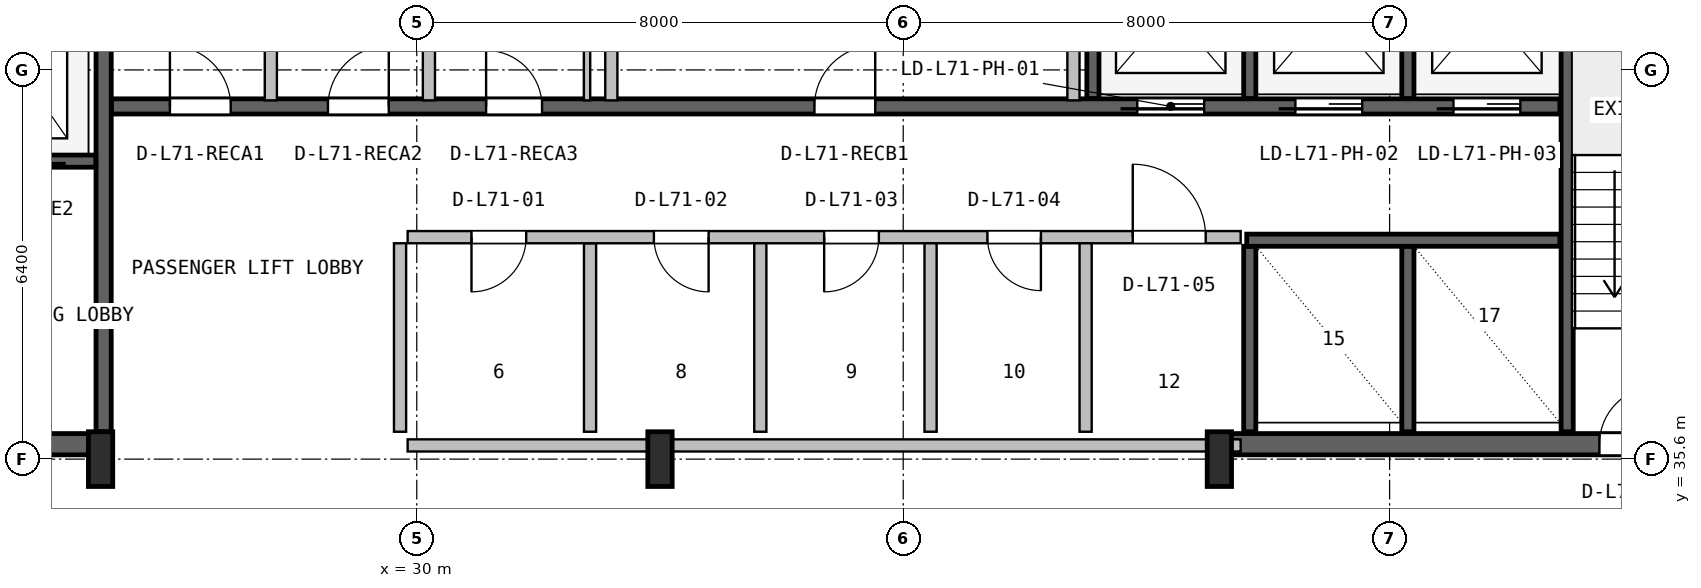
"""IFC4 building model, lengths in metres.
Left out: names, types, materials, properties, quantities, classifications, styles, units other than length and angle.
Written with IfcOpenShell. Run it as: python <this file> out.ifc"""

import sys

from ifc_helpers import new_model, si_unit, direction, frame, frame_2d, origin, origin_2d, place, context, subcontext, project, spatial, rectangle, i_section, extrude, source, transform, mapped, element, fill, save


model = new_model("IFC4")
c1 = context("Model", 3, precision=1e-05, world=origin(), true_north=direction((0.0, 1.0)))
c2 = subcontext(c1, "Body", "Model", "MODEL_VIEW")
j1 = project(units=[si_unit("LENGTHUNIT", "METRE"), si_unit("PLANEANGLEUNIT", "RADIAN")], contexts=[c1])
p1 = place(None, origin())
s1 = spatial("IfcSite", under=j1, at=p1, CompositionType="ELEMENT")
p2 = place(p1, origin())
s2 = spatial("IfcBuilding", under=s1, at=p2, CompositionType="ELEMENT")
p3 = place(p2, frame((0.0, 0.0, 285.0)))
s3 = spatial("IfcBuildingStorey", under=s2, at=p3, CompositionType="ELEMENT", Elevation=285.0)
p4 = place(p3, frame((15.67, 35.845, 0.0), z_axis=(0.0, 0.0, 1.0), x_axis=(1.0, 0.0, 0.0)))
e1 = element("IfcWall", 1, at=p4, inside=s3, PredefinedType="SHEAR", context=c2, shape_type="SweptSolid", body=[
    extrude(rectangle(XDim=9.13, YDim=0.35, at=frame_2d((4.565, 0.0))), origin(), (0.0, 0.0, 1.0), 3.55),
])
p5 = place(p4, frame((5.4, 0.0, 0.0)))
e2 = element("IfcOpeningElement", 2, at=p5, cuts=e1, PredefinedType="OPENING", context=c2, shape_type="SweptSolid", body=[
    extrude(rectangle(XDim=1.0, YDim=2.1, at=frame_2d((0.5, 1.05))), frame((0.0, 0.185, 0.0), z_axis=(0.0, -1.0, 0.0), x_axis=(1.0, 0.0, 0.0)), (0.0, 0.0, 1.0), 0.37),
])
p6 = place(p3, frame((43.2, 35.845, 0.0), z_axis=(0.0, 0.0, 1.0), x_axis=(1.0, 0.0, 0.0)))
e3 = element("IfcWall", 3, at=p6, inside=s3, PredefinedType="SHEAR", context=c2, shape_type="SweptSolid", body=[
    extrude(rectangle(XDim=9.13, YDim=0.35, at=frame_2d((4.565, 0.0))), origin(), (0.0, 0.0, 1.0), 3.55),
])
p7 = place(p6, frame((6.25, 0.0, 0.0)))
e4 = element("IfcOpeningElement", 4, at=p7, cuts=e3, PredefinedType="OPENING", context=c2, shape_type="SweptSolid", body=[
    extrude(rectangle(XDim=0.95, YDim=2.1, at=frame_2d((0.475, 1.05))), frame((0.0, 0.185, 0.0), z_axis=(0.0, -1.0, 0.0), x_axis=(1.0, 0.0, 0.0)), (0.0, 0.0, 1.0), 0.37),
])
m1 = source(origin(), c2, "Body", "SweptSolid", [
    extrude(i_section(OverallWidth=0.4, OverallDepth=0.9, WebThickness=0.016, FlangeThickness=0.028, FilletRadius=0.016, at=origin_2d()), origin(), (0.0, 0.0, 1.0), 3.8),
])
for number, where, z_axis, x_axis in (
    (5, (24.8, 35.6, 0.0), (0.0, 0.0, 1.0), (1.0, 0.0, 0.0)),
    (6, (34.0, 35.6, 0.0), (0.0, 0.0, 1.0), (1.0, 0.0, 0.0)),
    (7, (43.2, 35.6, 0.0), (0.0, 0.0, 1.0), (1.0, 0.0, 0.0)),
):
    element("IfcColumn", number, at=place(p3, frame(where, z_axis=z_axis, x_axis=x_axis)), inside=s3, PredefinedType="COLUMN", context=c2, shape_type="MappedRepresentation", body=[
        mapped(m1, transform((0.0, 0.0, 0.0), x_axis=(1.0, 0.0, 0.0), y_axis=(0.0, 1.0, 0.0), z_axis=(0.0, 0.0, 1.0), scale=1.0)),
    ])
p8 = place(p3, frame((24.85, 36.05, 0.0), z_axis=(0.0, 0.0, 1.0), x_axis=(0.0, 1.0, 0.0)))
e8 = element("IfcWall", 8, at=p8, inside=s3, PredefinedType="SHEAR", context=c2, shape_type="SweptSolid", body=[
    extrude(rectangle(XDim=10.45, YDim=0.25, at=frame_2d((5.225, 0.0))), origin(), (0.0, 0.0, 1.0), 3.55),
])
p9 = place(p3, frame((19.2, 40.5, 0.0), z_axis=(0.0, 0.0, 1.0), x_axis=(1.0, 0.0, 0.0)))
e9 = element("IfcWall", 9, at=p9, inside=s3, PredefinedType="SHEAR", context=c2, shape_type="SweptSolid", body=[
    extrude(rectangle(XDim=5.52, YDim=0.2, at=frame_2d((2.76, 0.0))), origin(), (0.0, 0.0, 1.0), 3.55),
])
p10 = place(p9, frame((1.05, 0.0, 0.0)))
e10 = element("IfcOpeningElement", 10, at=p10, cuts=e9, PredefinedType="OPENING", context=c2, shape_type="SweptSolid", body=[
    extrude(rectangle(XDim=1.1, YDim=2.18, at=frame_2d((0.55, 1.09))), frame((0.0, 0.11, 0.0), z_axis=(0.0, -1.0, 0.0), x_axis=(1.0, 0.0, 0.0)), (0.0, 0.0, 1.0), 0.22),
])
p11 = place(p9, frame((3.65, 0.0, 0.0)))
e11 = element("IfcOpeningElement", 11, at=p11, cuts=e9, PredefinedType="OPENING", context=c2, shape_type="SweptSolid", body=[
    extrude(rectangle(XDim=1.1, YDim=2.18, at=frame_2d((0.55, 1.09))), frame((0.0, 0.11, 0.0), z_axis=(0.0, -1.0, 0.0), x_axis=(1.0, 0.0, 0.0)), (0.0, 0.0, 1.0), 0.22),
])
p12 = place(p3, frame((48.92, 36.05, 0.0), z_axis=(0.0, 0.0, 1.0), x_axis=(0.0, 1.0, 0.0)))
e12 = element("IfcWall", 12, at=p12, inside=s3, PredefinedType="SHEAR", context=c2, shape_type="SweptSolid", body=[
    extrude(rectangle(XDim=10.5, YDim=0.2, at=frame_2d((5.25, 0.0))), origin(), (0.0, 0.0, 1.0), 3.55),
])
p13 = place(p3, frame((24.98, 41.4, 0.0), z_axis=(0.0, 0.0, 1.0), x_axis=(1.0, 0.0, 0.0)))
e13 = element("IfcWall", 13, at=p13, inside=s3, PredefinedType="SHEAR", context=c2, shape_type="SweptSolid", body=[
    extrude(rectangle(XDim=23.82, YDim=0.25, at=frame_2d((11.91, 0.0))), origin(), (0.0, 0.0, 1.0), 3.55),
])
p14 = place(p13, frame((16.87, 0.0, 0.0)))
e14 = element("IfcOpeningElement", 14, at=p14, cuts=e13, PredefinedType="OPENING", context=c2, shape_type="SweptSolid", body=[
    extrude(rectangle(XDim=1.1, YDim=2.18, at=frame_2d((0.55, 1.09))), frame((0.0, 0.135, 0.0), z_axis=(0.0, -1.0, 0.0), x_axis=(1.0, 0.0, 0.0)), (0.0, 0.0, 1.0), 0.27),
])
p15 = place(p13, frame((19.47, 0.0, 0.0)))
e15 = element("IfcOpeningElement", 15, at=p15, cuts=e13, PredefinedType="OPENING", context=c2, shape_type="SweptSolid", body=[
    extrude(rectangle(XDim=1.1, YDim=2.18, at=frame_2d((0.55, 1.09))), frame((0.0, 0.135, 0.0), z_axis=(0.0, -1.0, 0.0), x_axis=(1.0, 0.0, 0.0)), (0.0, 0.0, 1.0), 0.27),
])
p16 = place(p13, frame((22.07, 0.0, 0.0)))
e16 = element("IfcOpeningElement", 16, at=p16, cuts=e13, PredefinedType="OPENING", context=c2, shape_type="SweptSolid", body=[
    extrude(rectangle(XDim=1.1, YDim=2.18, at=frame_2d((0.55, 1.09))), frame((0.0, 0.135, 0.0), z_axis=(0.0, -1.0, 0.0), x_axis=(1.0, 0.0, 0.0)), (0.0, 0.0, 1.0), 0.27),
])
p17 = place(p13, frame((0.96, 0.0, 0.0)))
e17 = element("IfcOpeningElement", 17, at=p17, cuts=e13, PredefinedType="OPENING", context=c2, shape_type="SweptSolid", body=[
    extrude(rectangle(XDim=1.0, YDim=2.08, at=frame_2d((0.5, 1.04))), frame((0.0, 0.135, 0.0), z_axis=(0.0, -1.0, 0.0), x_axis=(1.0, 0.0, 0.0)), (0.0, 0.0, 1.0), 0.27),
])
p18 = place(p13, frame((3.56, 0.0, 0.0)))
e18 = element("IfcOpeningElement", 18, at=p18, cuts=e13, PredefinedType="OPENING", context=c2, shape_type="SweptSolid", body=[
    extrude(rectangle(XDim=1.0, YDim=2.08, at=frame_2d((0.5, 1.04))), frame((0.0, 0.135, 0.0), z_axis=(0.0, -1.0, 0.0), x_axis=(1.0, 0.0, 0.0)), (0.0, 0.0, 1.0), 0.27),
])
p19 = place(p13, frame((6.16, 0.0, 0.0)))
e19 = element("IfcOpeningElement", 19, at=p19, cuts=e13, PredefinedType="OPENING", context=c2, shape_type="SweptSolid", body=[
    extrude(rectangle(XDim=0.92, YDim=2.08, at=frame_2d((0.46, 1.04))), frame((0.0, 0.135, 0.0), z_axis=(0.0, -1.0, 0.0), x_axis=(1.0, 0.0, 0.0)), (0.0, 0.0, 1.0), 0.27),
])
p20 = place(p13, frame((11.56, 0.0, 0.0)))
e20 = element("IfcOpeningElement", 20, at=p20, cuts=e13, PredefinedType="OPENING", context=c2, shape_type="SweptSolid", body=[
    extrude(rectangle(XDim=1.0, YDim=2.08, at=frame_2d((0.5, 1.04))), frame((0.0, 0.135, 0.0), z_axis=(0.0, -1.0, 0.0), x_axis=(1.0, 0.0, 0.0)), (0.0, 0.0, 1.0), 0.27),
])
p21 = place(p3, frame((41.12, 41.53, 0.0), z_axis=(0.0, 0.0, 1.0), x_axis=(0.0, 1.0, 0.0)))
e21 = element("IfcWall", 21, at=p21, inside=s3, PredefinedType="SHEAR", context=c2, shape_type="SweptSolid", body=[
    extrude(rectangle(XDim=5.02, YDim=0.2, at=frame_2d((2.51, 0.0))), origin(), (0.0, 0.0, 1.0), 3.55),
])
for number, where, z_axis, x_axis in (
    (22, (43.7, 41.53, 0.0), (0.0, 0.0, 1.0), (0.0, 1.0, 0.0)),
    (23, (46.3, 41.53, 0.0), (0.0, 0.0, 1.0), (0.0, 1.0, 0.0)),
):
    element("IfcWall", number, at=place(p3, frame(where, z_axis=z_axis, x_axis=x_axis)), inside=s3, PredefinedType="SHEAR", context=c2, shape_type="SweptSolid", body=[
        extrude(rectangle(XDim=2.87, YDim=0.2, at=frame_2d((1.435, 0.0))), origin(), (0.0, 0.0, 1.0), 3.55),
    ])
for number, where, z_axis, x_axis in (
    (24, (43.7, 36.05, 0.0), (0.0, 0.0, 1.0), (0.0, 1.0, 0.0)),
    (25, (46.3, 36.05, 0.0), (0.0, 0.0, 1.0), (0.0, 1.0, 0.0)),
):
    element("IfcWall", number, at=place(p3, frame(where, z_axis=z_axis, x_axis=x_axis)), inside=s3, PredefinedType="SHEAR", context=c2, shape_type="SweptSolid", body=[
        extrude(rectangle(XDim=3.05, YDim=0.2, at=frame_2d((1.525, 0.0))), origin(), (0.0, 0.0, 1.0), 3.55),
    ])
p22 = place(p3, frame((43.65, 39.2, 0.0), z_axis=(0.0, 0.0, 1.0), x_axis=(1.0, 0.0, 0.0)))
e26 = element("IfcWall", 26, at=p22, inside=s3, PredefinedType="SHEAR", context=c2, shape_type="SweptSolid", body=[
    extrude(rectangle(XDim=5.15, YDim=0.2, at=frame_2d((2.575, 0.0))), origin(), (0.0, 0.0, 1.0), 3.55),
])
p23 = place(p3, frame((29.85, 35.825, 0.0), z_axis=(0.0, 0.0, 1.0), x_axis=(1.0, 0.0, 0.0)))
e27 = element("IfcWall", 27, at=p23, inside=s3, PredefinedType="SOLIDWALL", context=c2, shape_type="SweptSolid", body=[
    extrude(rectangle(XDim=13.7, YDim=0.2, at=frame_2d((6.85, 0.0))), origin(), (0.0, 0.0, 1.0), 2.575),
])
p24 = place(p3, frame((32.85, 36.05, 0.0), z_axis=(0.0, 0.0, 1.0), x_axis=(0.0, 1.0, 0.0)))
e28 = element("IfcWall", 28, at=p24, inside=s3, PredefinedType="PLUMBINGWALL", context=c2, shape_type="SweptSolid", body=[
    extrude(rectangle(XDim=3.1, YDim=0.2, at=frame_2d((1.55, 0.0))), origin(), (0.0, 0.0, 1.0), 3.53),
])
p25 = place(p3, frame((29.85, 39.25, 0.0), z_axis=(0.0, 0.0, 1.0), x_axis=(1.0, 0.0, 0.0)))
e29 = element("IfcWall", 29, at=p25, inside=s3, PredefinedType="SOLIDWALL", context=c2, shape_type="SweptSolid", body=[
    extrude(rectangle(XDim=13.7, YDim=0.2, at=frame_2d((6.85, 0.0))), origin(), (0.0, 0.0, 1.0), 3.53),
])
p26 = place(p25, frame((1.05, 0.0, 0.0)))
e30 = element("IfcOpeningElement", 30, at=p26, cuts=e29, PredefinedType="OPENING", context=c2, shape_type="SweptSolid", body=[
    extrude(rectangle(XDim=0.9, YDim=2.06, at=frame_2d((0.45, 1.03))), frame((0.0, 0.11, 0.0), z_axis=(0.0, -1.0, 0.0), x_axis=(1.0, 0.0, 0.0)), (0.0, 0.0, 1.0), 0.22),
])
p27 = place(p25, frame((4.05, 0.0, 0.0)))
e31 = element("IfcOpeningElement", 31, at=p27, cuts=e29, PredefinedType="OPENING", context=c2, shape_type="SweptSolid", body=[
    extrude(rectangle(XDim=0.9, YDim=2.06, at=frame_2d((0.45, 1.03))), frame((0.0, 0.11, 0.0), z_axis=(0.0, -1.0, 0.0), x_axis=(1.0, 0.0, 0.0)), (0.0, 0.0, 1.0), 0.22),
])
p28 = place(p25, frame((6.85, 0.0, 0.0)))
e32 = element("IfcOpeningElement", 32, at=p28, cuts=e29, PredefinedType="OPENING", context=c2, shape_type="SweptSolid", body=[
    extrude(rectangle(XDim=0.9, YDim=2.06, at=frame_2d((0.45, 1.03))), frame((0.0, 0.11, 0.0), z_axis=(0.0, -1.0, 0.0), x_axis=(1.0, 0.0, 0.0)), (0.0, 0.0, 1.0), 0.22),
])
p29 = place(p25, frame((9.535, 0.0, 0.0)))
e33 = element("IfcOpeningElement", 33, at=p29, cuts=e29, PredefinedType="OPENING", context=c2, shape_type="SweptSolid", body=[
    extrude(rectangle(XDim=0.88, YDim=2.06, at=frame_2d((0.44, 1.03))), frame((0.0, 0.11, 0.0), z_axis=(0.0, -1.0, 0.0), x_axis=(1.0, 0.0, 0.0)), (0.0, 0.0, 1.0), 0.22),
])
p30 = place(p25, frame((11.925, 0.0, 0.0)))
e34 = element("IfcOpeningElement", 34, at=p30, cuts=e29, PredefinedType="OPENING", context=c2, shape_type="SweptSolid", body=[
    extrude(rectangle(XDim=1.2, YDim=2.1, at=frame_2d((0.6, 1.05))), frame((0.0, 0.11, 0.0), z_axis=(0.0, -1.0, 0.0), x_axis=(1.0, 0.0, 0.0)), (0.0, 0.0, 1.0), 0.22),
])
for number, where, z_axis, x_axis in (
    (35, (29.725, 36.05, 0.0), (0.0, 0.0, 1.0), (0.0, 1.0, 0.0)),
    (36, (35.65, 36.05, 0.0), (0.0, 0.0, 1.0), (0.0, 1.0, 0.0)),
    (37, (38.45, 36.05, 0.0), (0.0, 0.0, 1.0), (0.0, 1.0, 0.0)),
):
    element("IfcWall", number, at=place(p3, frame(where, z_axis=z_axis, x_axis=x_axis)), inside=s3, PredefinedType="PLUMBINGWALL", context=c2, shape_type="SweptSolid", body=[
        extrude(rectangle(XDim=3.1, YDim=0.2, at=frame_2d((1.55, 0.0))), origin(), (0.0, 0.0, 1.0), 3.53),
    ])
p31 = place(p3, frame((41.0, 36.05, 0.0), z_axis=(0.0, 0.0, 1.0), x_axis=(0.0, 1.0, 0.0)))
e38 = element("IfcWall", 38, at=p31, inside=s3, PredefinedType="SOLIDWALL", context=c2, shape_type="SweptSolid", body=[
    extrude(rectangle(XDim=3.1, YDim=0.2, at=frame_2d((1.55, 0.0))), origin(), (0.0, 0.0, 1.0), 3.53),
])
for number, where, z_axis, x_axis in (
    (39, (27.6, 41.5, 0.0), (0.0, 0.0, 1.0), (0.0, 1.0, 0.0)),
    (40, (30.2, 41.5, 0.0), (0.0, 0.0, 1.0), (0.0, 1.0, 0.0)),
):
    element("IfcWall", number, at=place(p3, frame(where, z_axis=z_axis, x_axis=x_axis)), inside=s3, PredefinedType="SOLIDWALL", context=c2, shape_type="SweptSolid", body=[
        extrude(rectangle(XDim=5.02, YDim=0.2, at=frame_2d((2.51, 0.0))), origin(), (0.0, 0.0, 1.0), 3.53),
    ])
p32 = place(p3, frame((32.8, 41.5, 0.0), z_axis=(0.0, 0.0, 1.0), x_axis=(0.0, 1.0, 0.0)))
e41 = element("IfcWall", 41, at=p32, inside=s3, PredefinedType="PARTITIONING", context=c2, shape_type="SweptSolid", body=[
    extrude(rectangle(XDim=5.02, YDim=0.105, at=frame_2d((2.51, 0.0))), origin(), (0.0, 0.0, 1.0), 3.53),
])
for number, where, z_axis, x_axis in (
    (42, (40.8, 41.5, 0.0), (0.0, 0.0, 1.0), (0.0, 1.0, 0.0)),
    (43, (33.2, 41.5, 0.0), (0.0, 0.0, 1.0), (0.0, 1.0, 0.0)),
):
    element("IfcWall", number, at=place(p3, frame(where, z_axis=z_axis, x_axis=x_axis)), inside=s3, PredefinedType="SOLIDWALL", context=c2, shape_type="SweptSolid", body=[
        extrude(rectangle(XDim=5.02, YDim=0.2, at=frame_2d((2.51, 0.0))), origin(), (0.0, 0.0, 1.0), 3.53),
    ])
m2 = source(origin(), c2, "Body", "SweptSolid", [
    extrude(rectangle(XDim=0.95, YDim=2.1, at=frame_2d((0.475, 1.05))), frame((0.0, 0.025, 0.0), z_axis=(0.0, -1.0, 0.0), x_axis=(1.0, 0.0, 0.0)), (0.0, 0.0, 1.0), 0.05),
])
p33 = place(p7, origin())
e44 = element("IfcDoor", 44, at=p33, inside=s3, OperationType="SINGLE_SWING_RIGHT", PredefinedType="DOOR", context=c2, shape_type="MappedRepresentation", body=[
    mapped(m2, transform((0.0, 0.0, 0.0), x_axis=(1.0, 0.0, 0.0), y_axis=(0.0, 1.0, 0.0), z_axis=(0.0, 0.0, 1.0), scale=1.0)),
])
fill(e4, e44)
m3 = source(origin(), c2, "Body", "SweptSolid", [
    extrude(rectangle(XDim=1.1, YDim=2.18, at=frame_2d((0.55, 1.09))), frame((0.0, 0.025, 0.0), z_axis=(0.0, -1.0, 0.0), x_axis=(1.0, 0.0, 0.0)), (0.0, 0.0, 1.0), 0.05),
])
p34 = place(p14, frame((1.1, 0.0, 0.0), z_axis=(0.0, 0.0, 1.0), x_axis=(-1.0, 0.0, 0.0)))
e45 = element("IfcDoor", 45, at=p34, inside=s3, OperationType="SLIDING_TO_LEFT", PredefinedType="DOOR", context=c2, shape_type="MappedRepresentation", body=[
    mapped(m3, transform((0.0, 0.0, 0.0), x_axis=(1.0, 0.0, 0.0), y_axis=(0.0, 1.0, 0.0), z_axis=(0.0, 0.0, 1.0), scale=1.0)),
])
fill(e14, e45)
p35 = place(p15, frame((1.1, 0.0, 0.0), z_axis=(0.0, 0.0, 1.0), x_axis=(-1.0, 0.0, 0.0)))
e46 = element("IfcDoor", 46, at=p35, inside=s3, OperationType="SLIDING_TO_LEFT", PredefinedType="DOOR", context=c2, shape_type="MappedRepresentation", body=[
    mapped(m3, transform((0.0, 0.0, 0.0), x_axis=(1.0, 0.0, 0.0), y_axis=(0.0, 1.0, 0.0), z_axis=(0.0, 0.0, 1.0), scale=1.0)),
])
fill(e15, e46)
p36 = place(p16, frame((1.1, 0.0, 0.0), z_axis=(0.0, 0.0, 1.0), x_axis=(-1.0, 0.0, 0.0)))
e47 = element("IfcDoor", 47, at=p36, inside=s3, OperationType="SLIDING_TO_LEFT", PredefinedType="DOOR", context=c2, shape_type="MappedRepresentation", body=[
    mapped(m3, transform((0.0, 0.0, 0.0), x_axis=(1.0, 0.0, 0.0), y_axis=(0.0, 1.0, 0.0), z_axis=(0.0, 0.0, 1.0), scale=1.0)),
])
fill(e16, e47)
m4 = source(origin(), c2, "Body", "SweptSolid", [
    extrude(rectangle(XDim=1.0, YDim=2.08, at=frame_2d((0.5, 1.04))), frame((0.0, 0.025, 0.0), z_axis=(0.0, -1.0, 0.0), x_axis=(1.0, 0.0, 0.0)), (0.0, 0.0, 1.0), 0.05),
])
p37 = place(p17, origin())
e48 = element("IfcDoor", 48, at=p37, inside=s3, OperationType="SINGLE_SWING_LEFT", PredefinedType="DOOR", context=c2, shape_type="MappedRepresentation", body=[
    mapped(m4, transform((0.0, 0.0, 0.0), x_axis=(1.0, 0.0, 0.0), y_axis=(0.0, 1.0, 0.0), z_axis=(0.0, 0.0, 1.0), scale=1.0)),
])
fill(e17, e48)
p38 = place(p18, origin())
e49 = element("IfcDoor", 49, at=p38, inside=s3, OperationType="SINGLE_SWING_RIGHT", PredefinedType="DOOR", context=c2, shape_type="MappedRepresentation", body=[
    mapped(m4, transform((0.0, 0.0, 0.0), x_axis=(1.0, 0.0, 0.0), y_axis=(0.0, 1.0, 0.0), z_axis=(0.0, 0.0, 1.0), scale=1.0)),
])
fill(e18, e49)
m5 = source(origin(), c2, "Body", "SweptSolid", [
    extrude(rectangle(XDim=0.92, YDim=2.08, at=frame_2d((0.46, 1.04))), frame((0.0, 0.025, 0.0), z_axis=(0.0, -1.0, 0.0), x_axis=(1.0, 0.0, 0.0)), (0.0, 0.0, 1.0), 0.05),
])
p39 = place(p19, origin())
e50 = element("IfcDoor", 50, at=p39, inside=s3, OperationType="SINGLE_SWING_LEFT", PredefinedType="DOOR", context=c2, shape_type="MappedRepresentation", body=[
    mapped(m5, transform((0.0, 0.0, 0.0), x_axis=(1.0, 0.0, 0.0), y_axis=(0.0, 1.0, 0.0), z_axis=(0.0, 0.0, 1.0), scale=1.0)),
])
fill(e19, e50)
p40 = place(p20, origin())
e51 = element("IfcDoor", 51, at=p40, inside=s3, OperationType="SINGLE_SWING_RIGHT", PredefinedType="DOOR", context=c2, shape_type="MappedRepresentation", body=[
    mapped(m4, transform((0.0, 0.0, 0.0), x_axis=(1.0, 0.0, 0.0), y_axis=(0.0, 1.0, 0.0), z_axis=(0.0, 0.0, 1.0), scale=1.0)),
])
fill(e20, e51)
m6 = source(origin(), c2, "Body", "SweptSolid", [
    extrude(rectangle(XDim=0.9, YDim=2.06, at=frame_2d((0.45, 1.03))), frame((0.0, 0.025, 0.0), z_axis=(0.0, -1.0, 0.0), x_axis=(1.0, 0.0, 0.0)), (0.0, 0.0, 1.0), 0.05),
])
p41 = place(p26, frame((0.9, 0.0, 0.0), z_axis=(0.0, 0.0, 1.0), x_axis=(-1.0, 0.0, 0.0)))
e52 = element("IfcDoor", 52, at=p41, inside=s3, OperationType="SINGLE_SWING_LEFT", PredefinedType="DOOR", context=c2, shape_type="MappedRepresentation", body=[
    mapped(m6, transform((0.0, 0.0, 0.0), x_axis=(1.0, 0.0, 0.0), y_axis=(0.0, 1.0, 0.0), z_axis=(0.0, 0.0, 1.0), scale=1.0)),
])
fill(e30, e52)
p42 = place(p27, frame((0.9, 0.0, 0.0), z_axis=(0.0, 0.0, 1.0), x_axis=(-1.0, 0.0, 0.0)))
e53 = element("IfcDoor", 53, at=p42, inside=s3, OperationType="SINGLE_SWING_RIGHT", PredefinedType="DOOR", context=c2, shape_type="MappedRepresentation", body=[
    mapped(m6, transform((0.0, 0.0, 0.0), x_axis=(1.0, 0.0, 0.0), y_axis=(0.0, 1.0, 0.0), z_axis=(0.0, 0.0, 1.0), scale=1.0)),
])
fill(e31, e53)
p43 = place(p28, frame((0.9, 0.0, 0.0), z_axis=(0.0, 0.0, 1.0), x_axis=(-1.0, 0.0, 0.0)))
e54 = element("IfcDoor", 54, at=p43, inside=s3, OperationType="SINGLE_SWING_LEFT", PredefinedType="DOOR", context=c2, shape_type="MappedRepresentation", body=[
    mapped(m6, transform((0.0, 0.0, 0.0), x_axis=(1.0, 0.0, 0.0), y_axis=(0.0, 1.0, 0.0), z_axis=(0.0, 0.0, 1.0), scale=1.0)),
])
fill(e32, e54)
m7 = source(origin(), c2, "Body", "SweptSolid", [
    extrude(rectangle(XDim=0.88, YDim=2.06, at=frame_2d((0.44, 1.03))), frame((0.0, 0.025, 0.0), z_axis=(0.0, -1.0, 0.0), x_axis=(1.0, 0.0, 0.0)), (0.0, 0.0, 1.0), 0.05),
])
p44 = place(p29, frame((0.88, 0.0, 0.0), z_axis=(0.0, 0.0, 1.0), x_axis=(-1.0, 0.0, 0.0)))
e55 = element("IfcDoor", 55, at=p44, inside=s3, OperationType="SINGLE_SWING_RIGHT", PredefinedType="DOOR", context=c2, shape_type="MappedRepresentation", body=[
    mapped(m7, transform((0.0, 0.0, 0.0), x_axis=(1.0, 0.0, 0.0), y_axis=(0.0, 1.0, 0.0), z_axis=(0.0, 0.0, 1.0), scale=1.0)),
])
fill(e33, e55)
m8 = source(origin(), c2, "Body", "SweptSolid", [
    extrude(rectangle(XDim=1.2, YDim=2.1, at=frame_2d((0.6, 1.05))), frame((0.0, 0.025, 0.0), z_axis=(0.0, -1.0, 0.0), x_axis=(1.0, 0.0, 0.0)), (0.0, 0.0, 1.0), 0.05),
])
p45 = place(p30, origin())
e56 = element("IfcDoor", 56, at=p45, inside=s3, OperationType="SINGLE_SWING_LEFT", PredefinedType="DOOR", context=c2, shape_type="MappedRepresentation", body=[
    mapped(m8, transform((0.0, 0.0, 0.0), x_axis=(1.0, 0.0, 0.0), y_axis=(0.0, 1.0, 0.0), z_axis=(0.0, 0.0, 1.0), scale=1.0)),
])
fill(e34, e56)
save(model, sys.argv[1])
